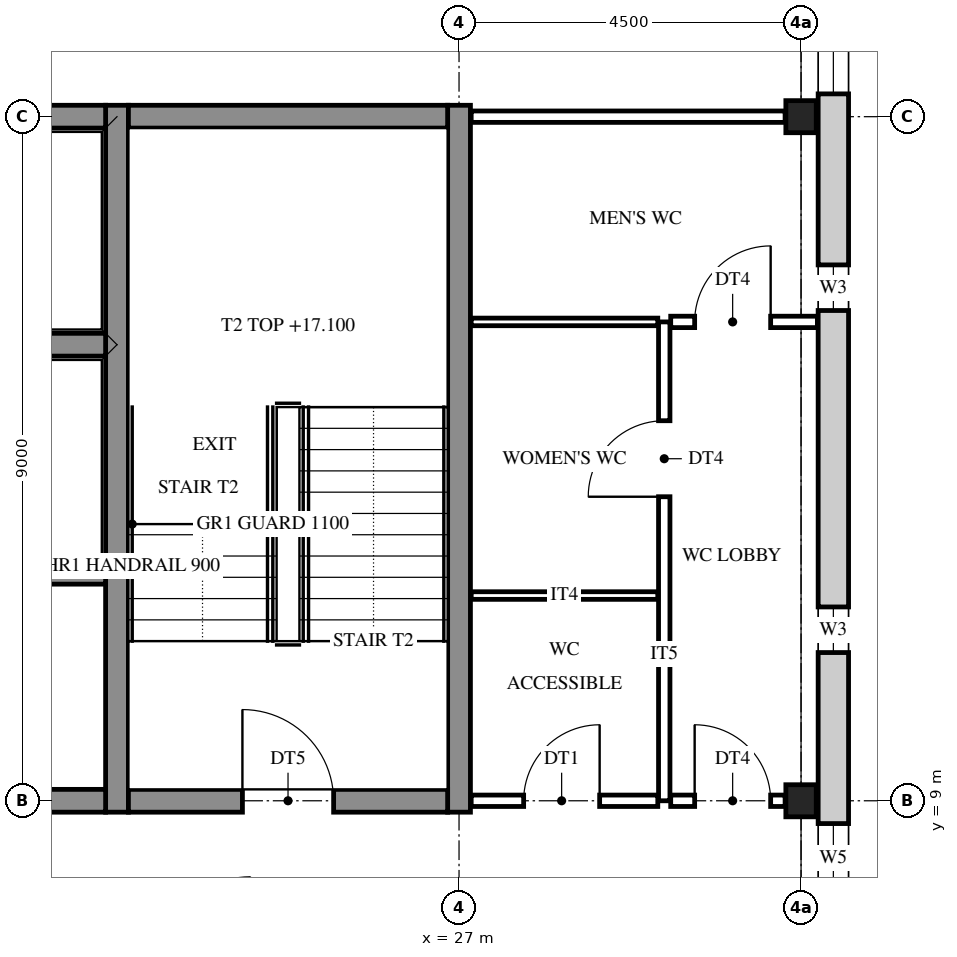
"""IFC4 building model, lengths in metres.
Left out: names, types, materials, properties, quantities, classifications, styles, units other than length and angle.
Written with IfcOpenShell. Run it as: python <this file> out.ifc"""

import sys

from ifc_helpers import new_model, si_unit, direction, frame, frame_2d, origin, origin_2d, place, context, subcontext, project, spatial, rectangle, i_section, extrude, element, fill, save


model = new_model("IFC4")
c1 = context("Model", 3, precision=1e-05, world=origin(), true_north=direction((0.0, 1.0)))
c2 = subcontext(c1, "Body", "Model", "MODEL_VIEW")
j1 = project(units=[si_unit("LENGTHUNIT", "METRE"), si_unit("PLANEANGLEUNIT", "RADIAN")], contexts=[c1])
p1 = place(None, origin())
s1 = spatial("IfcSite", under=j1, at=p1, CompositionType="ELEMENT")
p2 = place(p1, origin())
s2 = spatial("IfcBuilding", under=s1, at=p2, CompositionType="ELEMENT")
p3 = place(p2, frame((0.0, 0.0, 15.0)))
s3 = spatial("IfcBuildingStorey", under=s2, at=p3, CompositionType="ELEMENT", Elevation=15.0)
for number, where, z_axis, x_axis in (
    (1, (31.5, 9.0, 0.0), (0.0, 0.0, 1.0), (1.0, 0.0, 0.0)),
    (2, (31.5, 18.0, 0.0), (0.0, 0.0, 1.0), (1.0, 0.0, 0.0)),
):
    element("IfcColumn", number, at=place(p3, frame(where, z_axis=z_axis, x_axis=x_axis)), inside=s3, PredefinedType="COLUMN", context=c2, shape_type="SweptSolid", body=[
        extrude(i_section(OverallWidth=0.4, OverallDepth=0.422, WebThickness=0.028, FlangeThickness=0.036, at=origin_2d()), origin(), (0.0, 0.0, 1.0), 4.2),
    ])
for number, where, z_axis, x_axis in (
    (3, (22.5, 8.85, 0.0), (0.0, 0.0, 1.0), (0.0, 1.0, 0.0)),
    (4, (27.0, 8.85, 0.0), (0.0, 0.0, 1.0), (0.0, 1.0, 0.0)),
):
    element("IfcWall", number, at=place(p3, frame(where, z_axis=z_axis, x_axis=x_axis)), inside=s3, PredefinedType="SHEAR", context=c2, shape_type="SweptSolid", body=[
        extrude(rectangle(XDim=9.3, YDim=0.3, at=frame_2d((4.65, 0.0))), origin(), (0.0, 0.0, 1.0), 4.2),
    ])
p4 = place(p3, frame((19.65, 9.0, 0.0), z_axis=(0.0, 0.0, 1.0), x_axis=(1.0, 0.0, 0.0)))
e5 = element("IfcWall", 5, at=p4, inside=s3, PredefinedType="SHEAR", context=c2, shape_type="SweptSolid", body=[
    extrude(rectangle(XDim=2.7, YDim=0.3, at=frame_2d((1.35, 0.0))), origin(), (0.0, 0.0, 1.0), 4.2),
])
p5 = place(p3, frame((22.65, 9.0, 0.0), z_axis=(0.0, 0.0, 1.0), x_axis=(1.0, 0.0, 0.0)))
e6 = element("IfcWall", 6, at=p5, inside=s3, PredefinedType="SHEAR", context=c2, shape_type="SweptSolid", body=[
    extrude(rectangle(XDim=4.2, YDim=0.3, at=frame_2d((2.1, 0.0))), origin(), (0.0, 0.0, 1.0), 4.2),
])
p6 = place(p5, frame((1.5, 0.0, 0.0)))
e7 = element("IfcOpeningElement", 7, at=p6, cuts=e6, PredefinedType="OPENING", context=c2, shape_type="SweptSolid", body=[
    extrude(rectangle(XDim=1.2, YDim=2.1, at=frame_2d((0.6, 1.05))), frame((0.0, 0.16, 0.0), z_axis=(0.0, -1.0, 0.0), x_axis=(1.0, 0.0, 0.0)), (0.0, 0.0, 1.0), 0.32),
])
for number, where, z_axis, x_axis in (
    (8, (19.65, 12.0, 0.0), (0.0, 0.0, 1.0), (1.0, 0.0, 0.0)),
    (9, (19.65, 15.0, 0.0), (0.0, 0.0, 1.0), (1.0, 0.0, 0.0)),
    (10, (19.65, 18.0, 0.0), (0.0, 0.0, 1.0), (1.0, 0.0, 0.0)),
):
    element("IfcWall", number, at=place(p3, frame(where, z_axis=z_axis, x_axis=x_axis)), inside=s3, PredefinedType="SHEAR", context=c2, shape_type="SweptSolid", body=[
        extrude(rectangle(XDim=2.7, YDim=0.3, at=frame_2d((1.35, 0.0))), origin(), (0.0, 0.0, 1.0), 4.2),
    ])
p7 = place(p3, frame((22.65, 18.0, 0.0), z_axis=(0.0, 0.0, 1.0), x_axis=(1.0, 0.0, 0.0)))
e11 = element("IfcWall", 11, at=p7, inside=s3, PredefinedType="SHEAR", context=c2, shape_type="SweptSolid", body=[
    extrude(rectangle(XDim=4.2, YDim=0.3, at=frame_2d((2.1, 0.0))), origin(), (0.0, 0.0, 1.0), 4.2),
])
p8 = place(p3, frame((31.925, 27.225, 0.0), z_axis=(0.0, 0.0, 1.0), x_axis=(0.0, -1.0, 0.0)))
e12 = element("IfcWall", 12, at=p8, inside=s3, PredefinedType="STANDARD", context=c2, shape_type="SweptSolid", body=[
    extrude(rectangle(XDim=27.45, YDim=0.4, at=frame_2d((13.725, 0.0))), origin(), (0.0, 0.0, 1.0), 4.2),
])
p9 = place(p8, frame((26.025, 0.0, 0.9)))
e13 = element("IfcOpeningElement", 13, at=p9, cuts=e12, PredefinedType="OPENING", context=c2, shape_type="SweptSolid", body=[
    extrude(rectangle(XDim=0.9, YDim=2.0, at=frame_2d((0.45, 1.0))), frame((0.0, 0.21, 0.0), z_axis=(0.0, -1.0, 0.0), x_axis=(1.0, 0.0, 0.0)), (0.0, 0.0, 1.0), 0.42),
])
p10 = place(p8, frame((18.525, 0.0, 0.9)))
e14 = element("IfcOpeningElement", 14, at=p10, cuts=e12, PredefinedType="OPENING", context=c2, shape_type="SweptSolid", body=[
    extrude(rectangle(XDim=0.9, YDim=2.0, at=frame_2d((0.45, 1.0))), frame((0.0, 0.21, 0.0), z_axis=(0.0, -1.0, 0.0), x_axis=(1.0, 0.0, 0.0)), (0.0, 0.0, 1.0), 0.42),
])
p11 = place(p8, frame((15.675, 0.0, 1.6)))
e15 = element("IfcOpeningElement", 15, at=p11, cuts=e12, PredefinedType="OPENING", context=c2, shape_type="SweptSolid", body=[
    extrude(rectangle(XDim=0.6, YDim=0.9, at=frame_2d((0.3, 0.45))), frame((0.0, 0.21, 0.0), z_axis=(0.0, -1.0, 0.0), x_axis=(1.0, 0.0, 0.0)), (0.0, 0.0, 1.0), 0.42),
])
p12 = place(p8, frame((11.175, 0.0, 1.6)))
e16 = element("IfcOpeningElement", 16, at=p12, cuts=e12, PredefinedType="OPENING", context=c2, shape_type="SweptSolid", body=[
    extrude(rectangle(XDim=0.6, YDim=0.9, at=frame_2d((0.3, 0.45))), frame((0.0, 0.21, 0.0), z_axis=(0.0, -1.0, 0.0), x_axis=(1.0, 0.0, 0.0)), (0.0, 0.0, 1.0), 0.42),
])
p13 = place(p8, frame((8.025, 0.0, 0.9)))
e17 = element("IfcOpeningElement", 17, at=p13, cuts=e12, PredefinedType="OPENING", context=c2, shape_type="SweptSolid", body=[
    extrude(rectangle(XDim=0.9, YDim=2.0, at=frame_2d((0.45, 1.0))), frame((0.0, 0.21, 0.0), z_axis=(0.0, -1.0, 0.0), x_axis=(1.0, 0.0, 0.0)), (0.0, 0.0, 1.0), 0.42),
])
p14 = place(p8, frame((0.525, 0.0, 0.9)))
e18 = element("IfcOpeningElement", 18, at=p14, cuts=e12, PredefinedType="OPENING", context=c2, shape_type="SweptSolid", body=[
    extrude(rectangle(XDim=0.9, YDim=2.0, at=frame_2d((0.45, 1.0))), frame((0.0, 0.21, 0.0), z_axis=(0.0, -1.0, 0.0), x_axis=(1.0, 0.0, 0.0)), (0.0, 0.0, 1.0), 0.42),
])
p15 = place(p3, frame((29.7, 9.0, 0.0), z_axis=(0.0, 0.0, 1.0), x_axis=(0.0, 1.0, 0.0)))
e19 = element("IfcWall", 19, at=p15, inside=s3, PredefinedType="PARTITIONING", context=c2, shape_type="SweptSolid", body=[
    extrude(rectangle(XDim=6.3, YDim=0.15, at=frame_2d((3.15, 0.0))), origin(), (0.0, 0.0, 1.0), 3.537),
])
p16 = place(p15, frame((4.0, 0.0, 0.0)))
e20 = element("IfcOpeningElement", 20, at=p16, cuts=e19, PredefinedType="OPENING", context=c2, shape_type="SweptSolid", body=[
    extrude(rectangle(XDim=1.0, YDim=2.1, at=frame_2d((0.5, 1.05))), frame((0.0, 0.085, 0.0), z_axis=(0.0, -1.0, 0.0), x_axis=(1.0, 0.0, 0.0)), (0.0, 0.0, 1.0), 0.17),
])
p17 = place(p3, frame((27.16, 9.0, 0.0), z_axis=(0.0, 0.0, 1.0), x_axis=(1.0, 0.0, 0.0)))
e21 = element("IfcWall", 21, at=p17, inside=s3, PredefinedType="PARTITIONING", context=c2, shape_type="SweptSolid", body=[
    extrude(rectangle(XDim=2.455, YDim=0.15, at=frame_2d((1.228, 0.0))), origin(), (0.0, 0.0, 1.0), 3.537),
])
p18 = place(p17, frame((0.69, 0.0, 0.0)))
e22 = element("IfcOpeningElement", 22, at=p18, cuts=e21, PredefinedType="OPENING", context=c2, shape_type="SweptSolid", body=[
    extrude(rectangle(XDim=1.0, YDim=2.1, at=frame_2d((0.5, 1.05))), frame((0.0, 0.085, 0.0), z_axis=(0.0, -1.0, 0.0), x_axis=(1.0, 0.0, 0.0)), (0.0, 0.0, 1.0), 0.17),
])
p19 = place(p3, frame((29.785, 9.0, 0.0), z_axis=(0.0, 0.0, 1.0), x_axis=(1.0, 0.0, 0.0)))
e23 = element("IfcWall", 23, at=p19, inside=s3, PredefinedType="PARTITIONING", context=c2, shape_type="SweptSolid", body=[
    extrude(rectangle(XDim=1.505, YDim=0.15, at=frame_2d((0.752, 0.0))), origin(), (0.0, 0.0, 1.0), 3.537),
])
p20 = place(p19, frame((0.315, 0.0, 0.0)))
e24 = element("IfcOpeningElement", 24, at=p20, cuts=e23, PredefinedType="OPENING", context=c2, shape_type="SweptSolid", body=[
    extrude(rectangle(XDim=1.0, YDim=2.1, at=frame_2d((0.5, 1.05))), frame((0.0, 0.085, 0.0), z_axis=(0.0, -1.0, 0.0), x_axis=(1.0, 0.0, 0.0)), (0.0, 0.0, 1.0), 0.17),
])
for number, where, z_axis, x_axis in (
    (25, (27.16, 11.7, 0.0), (0.0, 0.0, 1.0), (1.0, 0.0, 0.0)),
    (26, (27.16, 15.3, 0.0), (0.0, 0.0, 1.0), (1.0, 0.0, 0.0)),
):
    element("IfcWall", number, at=place(p3, frame(where, z_axis=z_axis, x_axis=x_axis)), inside=s3, PredefinedType="PARTITIONING", context=c2, shape_type="SweptSolid", body=[
        extrude(rectangle(XDim=2.455, YDim=0.1, at=frame_2d((1.228, 0.0))), origin(), (0.0, 0.0, 1.0), 3.537),
    ])
p21 = place(p3, frame((29.785, 15.3, 0.0), z_axis=(0.0, 0.0, 1.0), x_axis=(1.0, 0.0, 0.0)))
e27 = element("IfcWall", 27, at=p21, inside=s3, PredefinedType="PARTITIONING", context=c2, shape_type="SweptSolid", body=[
    extrude(rectangle(XDim=1.93, YDim=0.15, at=frame_2d((0.965, 0.0))), origin(), (0.0, 0.0, 1.0), 3.537),
])
p22 = place(p21, frame((0.315, 0.0, 0.0)))
e28 = element("IfcOpeningElement", 28, at=p22, cuts=e27, PredefinedType="OPENING", context=c2, shape_type="SweptSolid", body=[
    extrude(rectangle(XDim=1.0, YDim=2.1, at=frame_2d((0.5, 1.05))), frame((0.0, 0.085, 0.0), z_axis=(0.0, -1.0, 0.0), x_axis=(1.0, 0.0, 0.0)), (0.0, 0.0, 1.0), 0.17),
])
p23 = place(p3, frame((27.16, 18.0, 0.0), z_axis=(0.0, 0.0, 1.0), x_axis=(1.0, 0.0, 0.0)))
e29 = element("IfcWall", 29, at=p23, inside=s3, PredefinedType="PARTITIONING", context=c2, shape_type="SweptSolid", body=[
    extrude(rectangle(XDim=4.13, YDim=0.15, at=frame_2d((2.065, 0.0))), origin(), (0.0, 0.0, 1.0), 3.537),
])
p24 = place(p10, origin())
e30 = element("IfcWindow", 30, at=p24, inside=s3, PartitioningType="SINGLE_PANEL", PredefinedType="WINDOW", context=c2, shape_type="SweptSolid", body=[
    extrude(rectangle(XDim=0.9, YDim=2.0, at=frame_2d((0.45, 1.0))), frame((0.0, 0.03, 0.0), z_axis=(0.0, -1.0, 0.0), x_axis=(1.0, 0.0, 0.0)), (0.0, 0.0, 1.0), 0.06),
])
fill(e14, e30)
p25 = place(p11, origin())
e31 = element("IfcWindow", 31, at=p25, inside=s3, PartitioningType="SINGLE_PANEL", PredefinedType="WINDOW", context=c2, shape_type="SweptSolid", body=[
    extrude(rectangle(XDim=0.6, YDim=0.9, at=frame_2d((0.3, 0.45))), frame((0.0, 0.03, 0.0), z_axis=(0.0, -1.0, 0.0), x_axis=(1.0, 0.0, 0.0)), (0.0, 0.0, 1.0), 0.06),
])
fill(e15, e31)
p26 = place(p12, origin())
e32 = element("IfcWindow", 32, at=p26, inside=s3, PartitioningType="SINGLE_PANEL", PredefinedType="WINDOW", context=c2, shape_type="SweptSolid", body=[
    extrude(rectangle(XDim=0.6, YDim=0.9, at=frame_2d((0.3, 0.45))), frame((0.0, 0.03, 0.0), z_axis=(0.0, -1.0, 0.0), x_axis=(1.0, 0.0, 0.0)), (0.0, 0.0, 1.0), 0.06),
])
fill(e16, e32)
p27 = place(p13, origin())
e33 = element("IfcWindow", 33, at=p27, inside=s3, PartitioningType="SINGLE_PANEL", PredefinedType="WINDOW", context=c2, shape_type="SweptSolid", body=[
    extrude(rectangle(XDim=0.9, YDim=2.0, at=frame_2d((0.45, 1.0))), frame((0.0, 0.03, 0.0), z_axis=(0.0, -1.0, 0.0), x_axis=(1.0, 0.0, 0.0)), (0.0, 0.0, 1.0), 0.06),
])
fill(e17, e33)
p28 = place(p6, origin())
e34 = element("IfcDoor", 34, at=p28, inside=s3, OperationType="SINGLE_SWING_LEFT", PredefinedType="DOOR", context=c2, shape_type="SweptSolid", body=[
    extrude(rectangle(XDim=1.2, YDim=2.1, at=frame_2d((0.6, 1.05))), frame((0.0, 0.025, 0.0), z_axis=(0.0, -1.0, 0.0), x_axis=(1.0, 0.0, 0.0)), (0.0, 0.0, 1.0), 0.05),
])
fill(e7, e34)
p29 = place(p18, origin())
e35 = element("IfcDoor", 35, at=p29, inside=s3, OperationType="SINGLE_SWING_RIGHT", PredefinedType="DOOR", context=c2, shape_type="SweptSolid", body=[
    extrude(rectangle(XDim=1.0, YDim=2.1, at=frame_2d((0.5, 1.05))), frame((0.0, 0.025, 0.0), z_axis=(0.0, -1.0, 0.0), x_axis=(1.0, 0.0, 0.0)), (0.0, 0.0, 1.0), 0.05),
])
fill(e22, e35)
p30 = place(p16, origin())
e36 = element("IfcDoor", 36, at=p30, inside=s3, OperationType="SINGLE_SWING_LEFT", PredefinedType="DOOR", context=c2, shape_type="SweptSolid", body=[
    extrude(rectangle(XDim=1.0, YDim=2.1, at=frame_2d((0.5, 1.05))), frame((0.0, 0.025, 0.0), z_axis=(0.0, -1.0, 0.0), x_axis=(1.0, 0.0, 0.0)), (0.0, 0.0, 1.0), 0.05),
])
fill(e20, e36)
p31 = place(p22, origin())
e37 = element("IfcDoor", 37, at=p31, inside=s3, OperationType="SINGLE_SWING_RIGHT", PredefinedType="DOOR", context=c2, shape_type="SweptSolid", body=[
    extrude(rectangle(XDim=1.0, YDim=2.1, at=frame_2d((0.5, 1.05))), frame((0.0, 0.025, 0.0), z_axis=(0.0, -1.0, 0.0), x_axis=(1.0, 0.0, 0.0)), (0.0, 0.0, 1.0), 0.05),
])
fill(e28, e37)
p32 = place(p20, origin())
e38 = element("IfcDoor", 38, at=p32, inside=s3, OperationType="SINGLE_SWING_LEFT", PredefinedType="DOOR", context=c2, shape_type="SweptSolid", body=[
    extrude(rectangle(XDim=1.0, YDim=2.1, at=frame_2d((0.5, 1.05))), frame((0.0, 0.025, 0.0), z_axis=(0.0, -1.0, 0.0), x_axis=(1.0, 0.0, 0.0)), (0.0, 0.0, 1.0), 0.05),
])
fill(e24, e38)
save(model, sys.argv[1])
